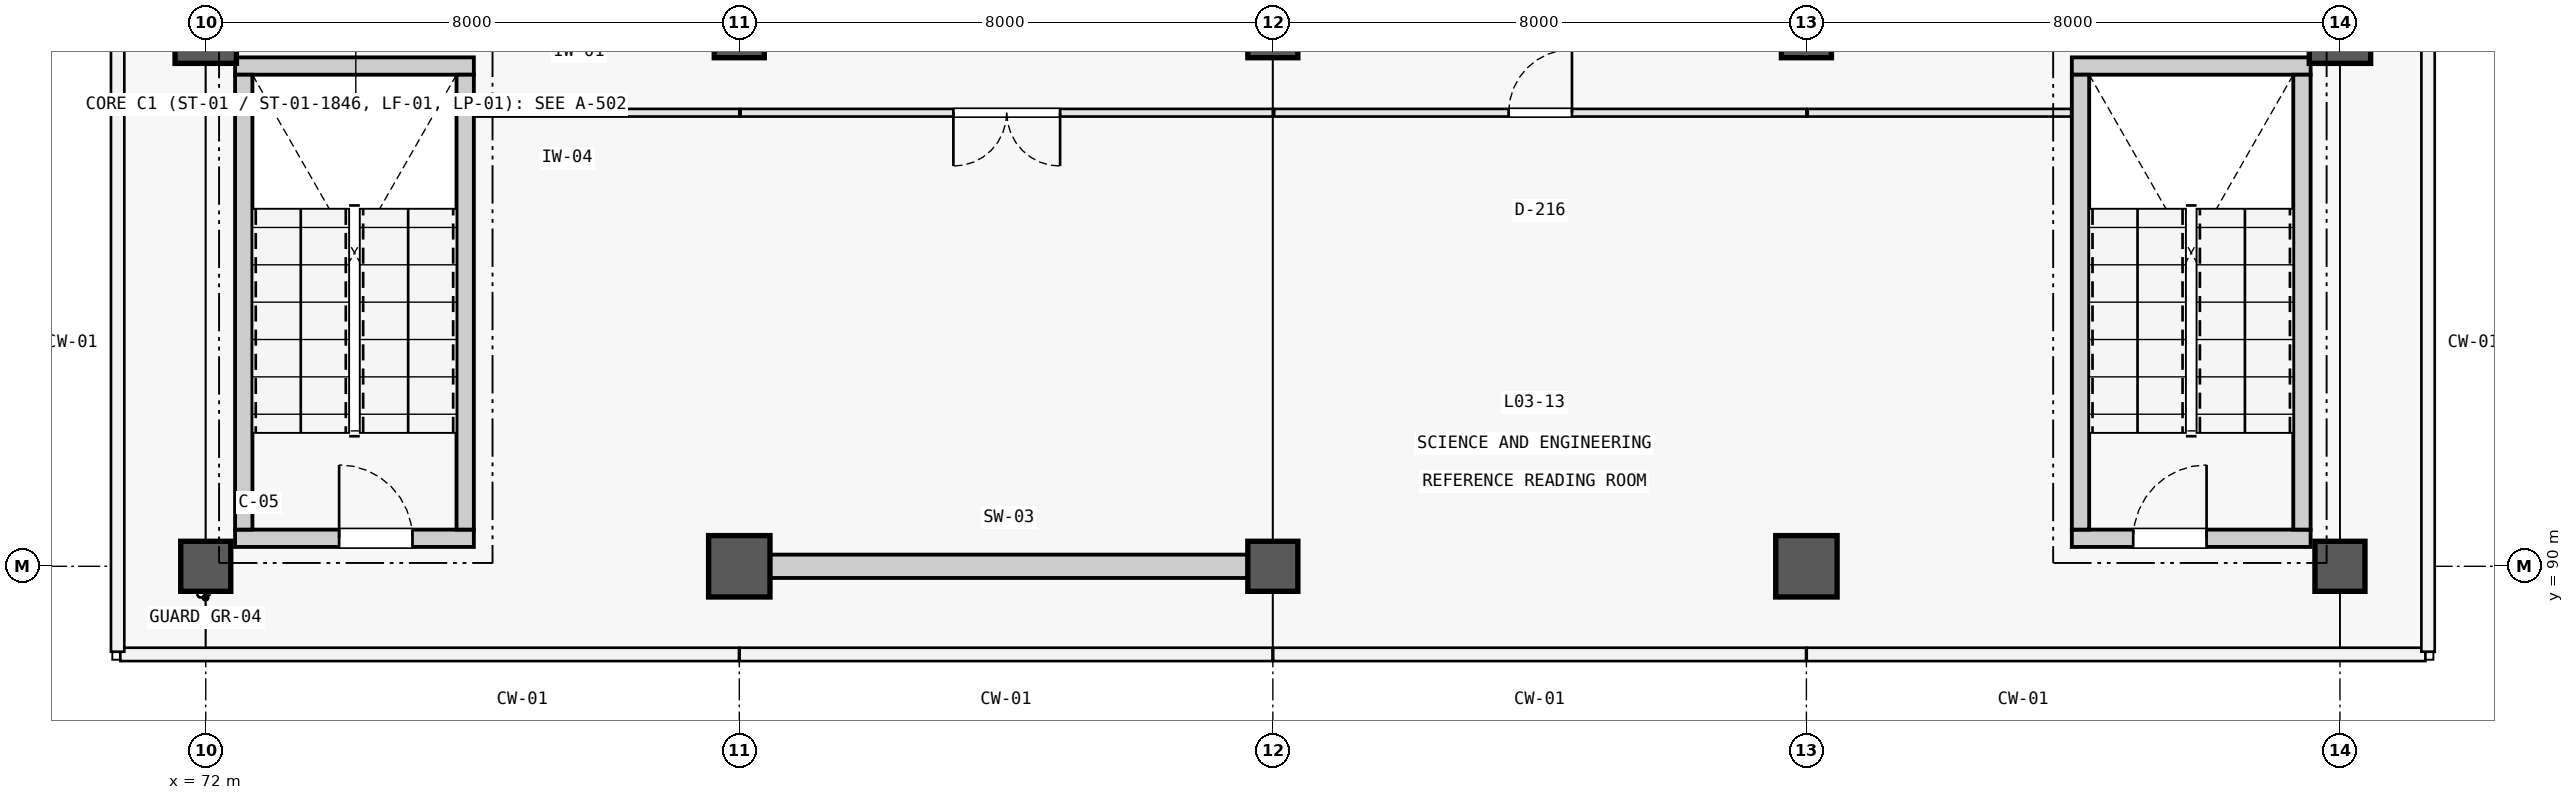
"""IFC4 building model, lengths in metres.
Left out: names, types, materials, properties, quantities, classifications, styles, units other than length and angle.
Written with IfcOpenShell. Run it as: python <this file> out.ifc"""

import sys

from ifc_helpers import new_model, si_unit, direction, frame, frame_2d, origin, origin_2d, place, context, subcontext, project, spatial, rectangle, extrude, element, fill, save


model = new_model("IFC4")
c1 = context("Model", 3, precision=1e-05, world=origin(), true_north=direction((0.0, 1.0)))
c2 = subcontext(c1, "Body", "Model", "MODEL_VIEW")
j1 = project(units=[si_unit("LENGTHUNIT", "METRE"), si_unit("PLANEANGLEUNIT", "RADIAN")], contexts=[c1])
p1 = place(None, origin())
s1 = spatial("IfcSite", under=j1, at=p1, CompositionType="ELEMENT")
p2 = place(p1, origin())
s2 = spatial("IfcBuilding", under=s1, at=p2, CompositionType="ELEMENT")
p3 = place(p2, frame((0.0, 0.0, 10.5)))
s3 = spatial("IfcBuildingStorey", under=s2, at=p3, CompositionType="ELEMENT", Elevation=10.5)
p4 = place(p3, frame((72.0, 90.0, 0.0), z_axis=(0.0, 0.0, 1.0), x_axis=(1.0, 0.0, 0.0)))
e1 = element("IfcColumn", 1, at=p4, inside=s3, PredefinedType="COLUMN", context=c2, shape_type="SweptSolid", body=[
    extrude(rectangle(XDim=0.75, YDim=0.75, at=origin_2d()), origin(), (0.0, 0.0, 1.0), 4.8),
])
for number, where, z_axis, x_axis in (
    (2, (72.0, 98.0, 0.0), (0.0, 0.0, 1.0), (1.0, 0.0, 0.0)),
    (3, (80.0, 90.0, 0.0), (0.0, 0.0, 1.0), (1.0, 0.0, 0.0)),
):
    element("IfcColumn", number, at=place(p3, frame(where, z_axis=z_axis, x_axis=x_axis)), inside=s3, PredefinedType="COLUMN", context=c2, shape_type="SweptSolid", body=[
        extrude(rectangle(XDim=0.92, YDim=0.92, at=origin_2d()), origin(), (0.0, 0.0, 1.0), 4.8),
    ])
for number, where, z_axis, x_axis in (
    (4, (80.0, 98.0, 0.0), (0.0, 0.0, 1.0), (1.0, 0.0, 0.0)),
    (5, (88.0, 90.0, 0.0), (0.0, 0.0, 1.0), (1.0, 0.0, 0.0)),
    (6, (88.0, 98.0, 0.0), (0.0, 0.0, 1.0), (1.0, 0.0, 0.0)),
):
    element("IfcColumn", number, at=place(p3, frame(where, z_axis=z_axis, x_axis=x_axis)), inside=s3, PredefinedType="COLUMN", context=c2, shape_type="SweptSolid", body=[
        extrude(rectangle(XDim=0.75, YDim=0.75, at=origin_2d()), origin(), (0.0, 0.0, 1.0), 4.8),
    ])
p5 = place(p3, frame((96.0, 90.0, 0.0), z_axis=(0.0, 0.0, 1.0), x_axis=(1.0, 0.0, 0.0)))
e7 = element("IfcColumn", 7, at=p5, inside=s3, PredefinedType="COLUMN", context=c2, shape_type="SweptSolid", body=[
    extrude(rectangle(XDim=0.92, YDim=0.92, at=origin_2d()), origin(), (0.0, 0.0, 1.0), 4.8),
])
for number, where, z_axis, x_axis in (
    (8, (96.0, 98.0, 0.0), (0.0, 0.0, 1.0), (1.0, 0.0, 0.0)),
    (9, (104.0, 90.0, 0.0), (0.0, 0.0, 1.0), (1.0, 0.0, 0.0)),
):
    element("IfcColumn", number, at=place(p3, frame(where, z_axis=z_axis, x_axis=x_axis)), inside=s3, PredefinedType="COLUMN", context=c2, shape_type="SweptSolid", body=[
        extrude(rectangle(XDim=0.75, YDim=0.75, at=origin_2d()), origin(), (0.0, 0.0, 1.0), 4.8),
    ])
p6 = place(p3, frame((104.0, 98.0, 0.0), z_axis=(0.0, 0.0, 1.0), x_axis=(1.0, 0.0, 0.0)))
e10 = element("IfcColumn", 10, at=p6, inside=s3, PredefinedType="COLUMN", context=c2, shape_type="SweptSolid", body=[
    extrude(rectangle(XDim=0.92, YDim=0.92, at=origin_2d()), origin(), (0.0, 0.0, 1.0), 4.8),
])
p7 = place(p3, frame((80.46, 90.0, 0.0), z_axis=(0.0, 0.0, 1.0), x_axis=(1.0, 0.0, 0.0)))
e11 = element("IfcWall", 11, at=p7, inside=s3, PredefinedType="SHEAR", context=c2, shape_type="SweptSolid", body=[
    extrude(rectangle(XDim=7.165, YDim=0.35, at=frame_2d((3.583, 0.0))), origin(), (0.0, 0.0, 1.0), 4.48),
])
p8 = place(p3, frame((72.44, 90.42, 0.0), z_axis=(0.0, 0.0, 1.0), x_axis=(1.0, 0.0, 0.0)))
e12 = element("IfcWall", 12, at=p8, inside=s3, PredefinedType="SOLIDWALL", context=c2, shape_type="SweptSolid", body=[
    extrude(rectangle(XDim=3.58, YDim=0.26, at=frame_2d((1.79, 0.0))), origin(), (0.0, 0.0, 1.0), 4.8),
])
p9 = place(p8, frame((1.56, 0.0, 0.0)))
e13 = element("IfcOpeningElement", 13, at=p9, cuts=e12, PredefinedType="OPENING", context=c2, shape_type="SweptSolid", body=[
    extrude(rectangle(XDim=1.1, YDim=2.2, at=frame_2d((0.55, 1.1))), frame((0.0, 0.142, 0.0), z_axis=(0.0, -1.0, 0.0), x_axis=(1.0, 0.0, 0.0)), (0.0, 0.0, 1.0), 0.284),
])
p10 = place(p3, frame((72.44, 97.5, 0.0), z_axis=(0.0, 0.0, 1.0), x_axis=(1.0, 0.0, 0.0)))
e14 = element("IfcWall", 14, at=p10, inside=s3, PredefinedType="SOLIDWALL", context=c2, shape_type="SweptSolid", body=[
    extrude(rectangle(XDim=3.58, YDim=0.26, at=frame_2d((1.79, 0.0))), origin(), (0.0, 0.0, 1.0), 4.8),
])
for number, where, z_axis, x_axis in (
    (15, (72.57, 90.55, 0.0), (0.0, 0.0, 1.0), (0.0, 1.0, 0.0)),
    (16, (75.89, 90.55, 0.0), (0.0, 0.0, 1.0), (0.0, 1.0, 0.0)),
):
    element("IfcWall", number, at=place(p3, frame(where, z_axis=z_axis, x_axis=x_axis)), inside=s3, PredefinedType="SOLIDWALL", context=c2, shape_type="SweptSolid", body=[
        extrude(rectangle(XDim=6.82, YDim=0.26, at=frame_2d((3.41, 0.0))), origin(), (0.0, 0.0, 1.0), 4.8),
    ])
p11 = place(p3, frame((99.98, 90.42, 0.0), z_axis=(0.0, 0.0, 1.0), x_axis=(1.0, 0.0, 0.0)))
e17 = element("IfcWall", 17, at=p11, inside=s3, PredefinedType="SOLIDWALL", context=c2, shape_type="SweptSolid", body=[
    extrude(rectangle(XDim=3.58, YDim=0.26, at=frame_2d((1.79, 0.0))), origin(), (0.0, 0.0, 1.0), 4.8),
])
p12 = place(p11, frame((0.92, 0.0, 0.0)))
e18 = element("IfcOpeningElement", 18, at=p12, cuts=e17, PredefinedType="OPENING", context=c2, shape_type="SweptSolid", body=[
    extrude(rectangle(XDim=1.1, YDim=2.2, at=frame_2d((0.55, 1.1))), frame((0.0, 0.142, 0.0), z_axis=(0.0, -1.0, 0.0), x_axis=(1.0, 0.0, 0.0)), (0.0, 0.0, 1.0), 0.284),
])
p13 = place(p3, frame((99.98, 97.5, 0.0), z_axis=(0.0, 0.0, 1.0), x_axis=(1.0, 0.0, 0.0)))
e19 = element("IfcWall", 19, at=p13, inside=s3, PredefinedType="SOLIDWALL", context=c2, shape_type="SweptSolid", body=[
    extrude(rectangle(XDim=3.58, YDim=0.26, at=frame_2d((1.79, 0.0))), origin(), (0.0, 0.0, 1.0), 4.8),
])
for number, where, z_axis, x_axis in (
    (20, (100.11, 90.55, 0.0), (0.0, 0.0, 1.0), (0.0, 1.0, 0.0)),
    (21, (103.43, 90.55, 0.0), (0.0, 0.0, 1.0), (0.0, 1.0, 0.0)),
):
    element("IfcWall", number, at=place(p3, frame(where, z_axis=z_axis, x_axis=x_axis)), inside=s3, PredefinedType="SOLIDWALL", context=c2, shape_type="SweptSolid", body=[
        extrude(rectangle(XDim=6.82, YDim=0.26, at=frame_2d((3.41, 0.0))), origin(), (0.0, 0.0, 1.0), 4.8),
    ])
p14 = place(p3, frame((76.03, 96.8, 0.0), z_axis=(0.0, 0.0, 1.0), x_axis=(1.0, 0.0, 0.0)))
e22 = element("IfcWall", 22, at=p14, inside=s3, PredefinedType="PARTITIONING", context=c2, shape_type="SweptSolid", body=[
    extrude(rectangle(XDim=3.97, YDim=0.115, at=frame_2d((1.985, 0.0))), origin(), (0.0, 0.0, 1.0), 3.33),
])
p15 = place(p3, frame((80.02, 96.8, 0.0), z_axis=(0.0, 0.0, 1.0), x_axis=(1.0, 0.0, 0.0)))
e23 = element("IfcWall", 23, at=p15, inside=s3, PredefinedType="PARTITIONING", context=c2, shape_type="SweptSolid", body=[
    extrude(rectangle(XDim=7.98, YDim=0.115, at=frame_2d((3.99, 0.0))), origin(), (0.0, 0.0, 1.0), 3.33),
])
p16 = place(p15, frame((3.19, 0.0, 0.0)))
e24 = element("IfcOpeningElement", 24, at=p16, cuts=e23, PredefinedType="OPENING", context=c2, shape_type="SweptSolid", body=[
    extrude(rectangle(XDim=1.6, YDim=2.2, at=frame_2d((0.8, 1.1))), frame((0.0, 0.069, 0.0), z_axis=(0.0, -1.0, 0.0), x_axis=(1.0, 0.0, 0.0)), (0.0, 0.0, 1.0), 0.139),
])
p17 = place(p3, frame((88.02, 96.8, 0.0), z_axis=(0.0, 0.0, 1.0), x_axis=(1.0, 0.0, 0.0)))
e25 = element("IfcWall", 25, at=p17, inside=s3, PredefinedType="PARTITIONING", context=c2, shape_type="SweptSolid", body=[
    extrude(rectangle(XDim=7.98, YDim=0.115, at=frame_2d((3.99, 0.0))), origin(), (0.0, 0.0, 1.0), 3.33),
])
p18 = place(p17, frame((3.515, 0.0, 0.0)))
e26 = element("IfcOpeningElement", 26, at=p18, cuts=e25, PredefinedType="OPENING", context=c2, shape_type="SweptSolid", body=[
    extrude(rectangle(XDim=0.95, YDim=2.15, at=frame_2d((0.475, 1.075))), frame((0.0, 0.069, 0.0), z_axis=(0.0, -1.0, 0.0), x_axis=(1.0, 0.0, 0.0)), (0.0, 0.0, 1.0), 0.139),
])
p19 = place(p3, frame((96.02, 96.8, 0.0), z_axis=(0.0, 0.0, 1.0), x_axis=(1.0, 0.0, 0.0)))
e27 = element("IfcWall", 27, at=p19, inside=s3, PredefinedType="PARTITIONING", context=c2, shape_type="SweptSolid", body=[
    extrude(rectangle(XDim=3.95, YDim=0.115, at=frame_2d((1.975, 0.0))), origin(), (0.0, 0.0, 1.0), 3.33),
])
p20 = place(p9, origin())
e28 = element("IfcDoor", 28, at=p20, inside=s3, OperationType="SINGLE_SWING_LEFT", PredefinedType="DOOR", context=c2, shape_type="SweptSolid", body=[
    extrude(rectangle(XDim=1.1, YDim=2.2, at=frame_2d((0.55, 1.1))), frame((0.0, 0.025, 0.0), z_axis=(0.0, -1.0, 0.0), x_axis=(1.0, 0.0, 0.0)), (0.0, 0.0, 1.0), 0.05),
])
fill(e13, e28)
p21 = place(p12, origin())
e29 = element("IfcDoor", 29, at=p21, inside=s3, OperationType="SINGLE_SWING_RIGHT", PredefinedType="DOOR", context=c2, shape_type="SweptSolid", body=[
    extrude(rectangle(XDim=1.1, YDim=2.2, at=frame_2d((0.55, 1.1))), frame((0.0, 0.025, 0.0), z_axis=(0.0, -1.0, 0.0), x_axis=(1.0, 0.0, 0.0)), (0.0, 0.0, 1.0), 0.05),
])
fill(e18, e29)
p22 = place(p16, frame((1.6, 0.0, 0.0), z_axis=(0.0, 0.0, 1.0), x_axis=(-1.0, 0.0, 0.0)))
e30 = element("IfcDoor", 30, at=p22, inside=s3, OperationType="DOUBLE_DOOR_SINGLE_SWING", PredefinedType="DOOR", context=c2, shape_type="SweptSolid", body=[
    extrude(rectangle(XDim=1.6, YDim=2.2, at=frame_2d((0.8, 1.1))), frame((0.0, 0.025, 0.0), z_axis=(0.0, -1.0, 0.0), x_axis=(1.0, 0.0, 0.0)), (0.0, 0.0, 1.0), 0.05),
])
fill(e24, e30)
p23 = place(p18, origin())
e31 = element("IfcDoor", 31, at=p23, inside=s3, OperationType="SINGLE_SWING_RIGHT", PredefinedType="DOOR", context=c2, shape_type="SweptSolid", body=[
    extrude(rectangle(XDim=0.95, YDim=2.15, at=frame_2d((0.475, 1.075))), frame((0.0, 0.025, 0.0), z_axis=(0.0, -1.0, 0.0), x_axis=(1.0, 0.0, 0.0)), (0.0, 0.0, 1.0), 0.05),
])
fill(e26, e31)
save(model, sys.argv[1])
